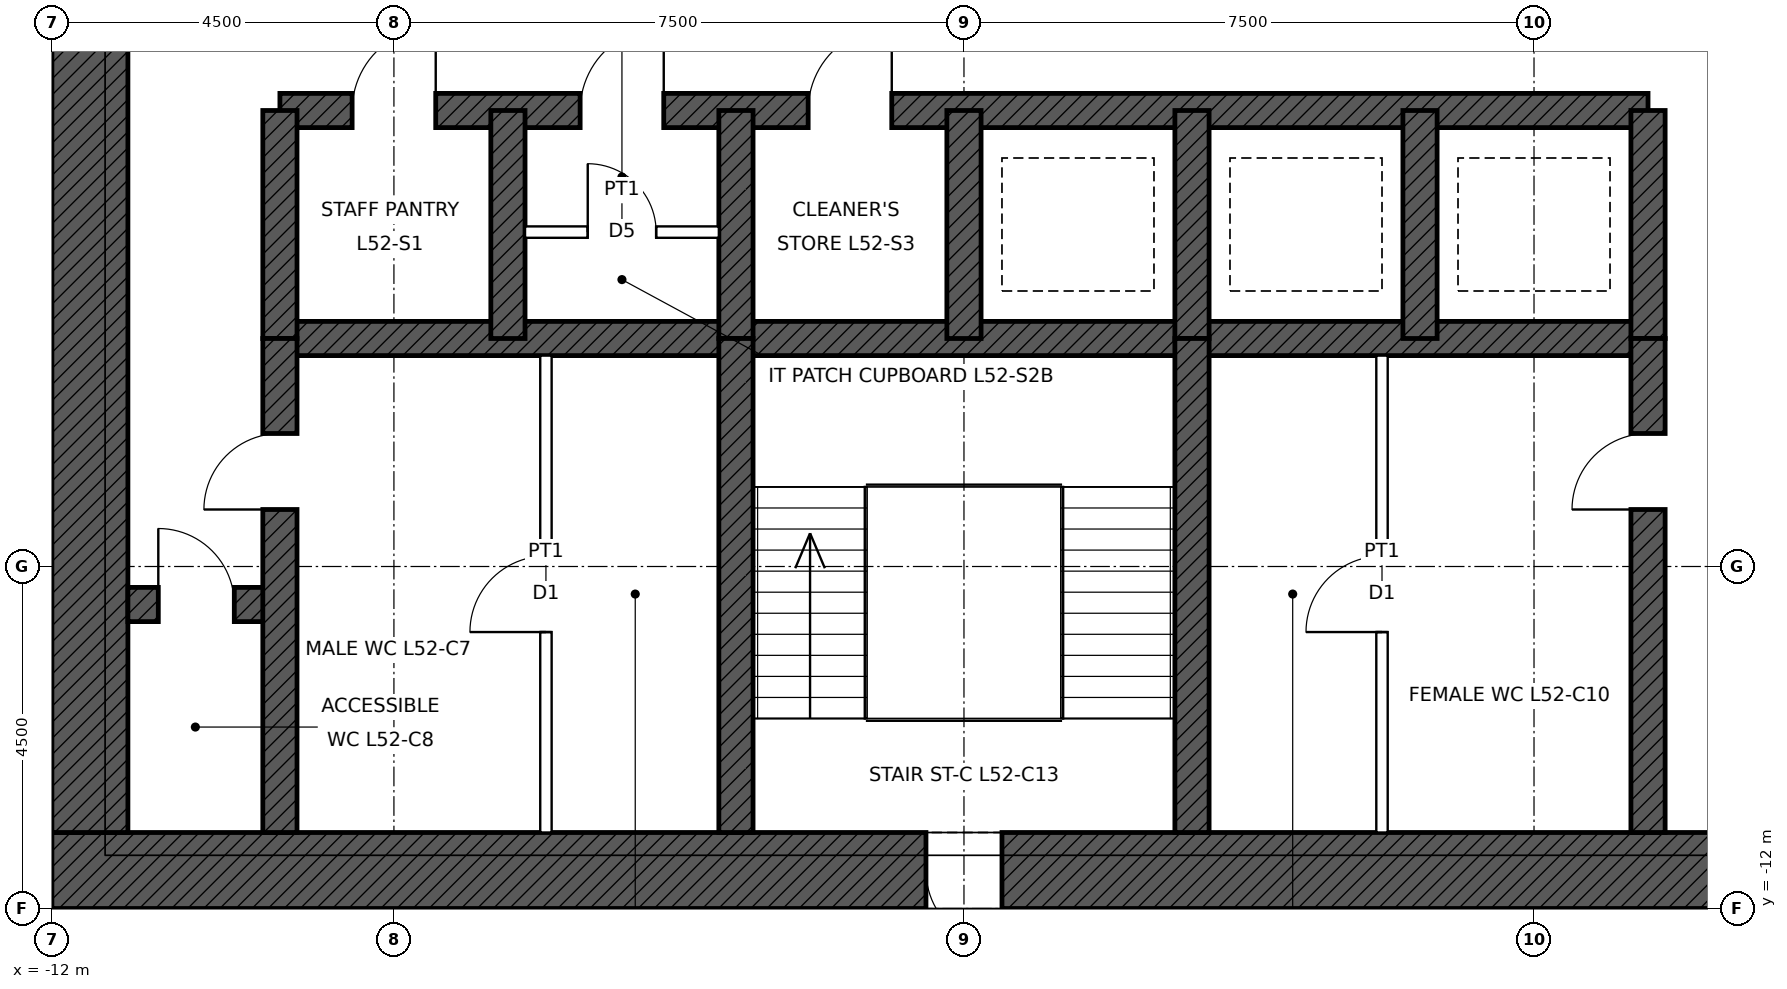
"""IFC4 building model, lengths in metres.
Left out: names, types, materials, properties, quantities, classifications, styles, units other than length and angle.
Written with IfcOpenShell. Run it as: python <this file> out.ifc"""

import sys

from ifc_helpers import new_model, si_unit, direction, frame, frame_2d, origin, place, context, subcontext, project, spatial, rectangle, extrude, element, fill, save


model = new_model("IFC4")
c1 = context("Model", 3, precision=1e-05, world=origin(), true_north=direction((0.0, 1.0)))
c2 = subcontext(c1, "Body", "Model", "MODEL_VIEW")
j1 = project(units=[si_unit("LENGTHUNIT", "METRE"), si_unit("PLANEANGLEUNIT", "RADIAN")], contexts=[c1])
p1 = place(None, origin())
s1 = spatial("IfcSite", under=j1, at=p1, CompositionType="ELEMENT")
p2 = place(p1, origin())
s2 = spatial("IfcBuilding", under=s1, at=p2, CompositionType="ELEMENT")
p3 = place(p2, frame((0.0, 0.0, 241.9)))
s3 = spatial("IfcBuildingStorey", under=s2, at=p3, CompositionType="ELEMENT", Elevation=241.9)
p4 = place(p3, frame((12.0, -11.5, 0.0), z_axis=(0.0, 0.0, 1.0), x_axis=(-1.0, 0.0, 0.0)))
e1 = element("IfcWall", 1, at=p4, inside=s3, PredefinedType="SHEAR", context=c2, shape_type="SweptSolid", body=[
    extrude(rectangle(XDim=24.0, YDim=1.0, at=frame_2d((12.0, 0.0))), origin(), (0.0, 0.0, 1.0), 4.0),
])
p5 = place(p4, frame((11.5, 0.0, 0.0)))
e2 = element("IfcOpeningElement", 2, at=p5, cuts=e1, PredefinedType="OPENING", context=c2, shape_type="SweptSolid", body=[
    extrude(rectangle(XDim=1.0, YDim=2.1, at=frame_2d((0.5, 1.05))), frame((0.0, 0.51, 0.0), z_axis=(0.0, -1.0, 0.0), x_axis=(1.0, 0.0, 0.0)), (0.0, 0.0, 1.0), 1.02),
])
p6 = place(p4, frame((1.0, 0.0, 0.0)))
e3 = element("IfcOpeningElement", 3, at=p6, cuts=e1, PredefinedType="OPENING", context=c2, shape_type="SweptSolid", body=[
    extrude(rectangle(XDim=1.0, YDim=2.4, at=frame_2d((0.5, 1.2))), frame((0.0, 0.51, 0.0), z_axis=(0.0, -1.0, 0.0), x_axis=(1.0, 0.0, 0.0)), (0.0, 0.0, 1.0), 1.02),
])
p7 = place(p3, frame((-11.5, -11.0, 0.0), z_axis=(0.0, 0.0, 1.0), x_axis=(0.0, 1.0, 0.0)))
e4 = element("IfcWall", 4, at=p7, inside=s3, PredefinedType="SHEAR", context=c2, shape_type="SweptSolid", body=[
    extrude(rectangle(XDim=22.0, YDim=1.0, at=frame_2d((11.0, 0.0))), origin(), (0.0, 0.0, 1.0), 4.0),
])
p8 = place(p7, frame((10.5, 0.0, 0.0)))
e5 = element("IfcOpeningElement", 5, at=p8, cuts=e4, PredefinedType="OPENING", context=c2, shape_type="SweptSolid", body=[
    extrude(rectangle(XDim=1.0, YDim=2.4, at=frame_2d((0.5, 1.2))), frame((0.0, 0.51, 0.0), z_axis=(0.0, -1.0, 0.0), x_axis=(1.0, 0.0, 0.0)), (0.0, 0.0, 1.0), 1.02),
])
p9 = place(p3, frame((-9.0, -1.5, 0.0), z_axis=(0.0, 0.0, 1.0), x_axis=(1.0, 0.0, 0.0)))
e6 = element("IfcWall", 6, at=p9, inside=s3, PredefinedType="SHEAR", context=c2, shape_type="SweptSolid", body=[
    extrude(rectangle(XDim=18.0, YDim=0.45, at=frame_2d((9.0, 0.0))), origin(), (0.0, 0.0, 1.0), 4.0),
])
p10 = place(p9, frame((0.95, 0.0, 0.0)))
e7 = element("IfcOpeningElement", 7, at=p10, cuts=e6, PredefinedType="OPENING", context=c2, shape_type="SweptSolid", body=[
    extrude(rectangle(XDim=1.1, YDim=2.1, at=frame_2d((0.55, 1.05))), frame((0.0, 0.235, 0.0), z_axis=(0.0, -1.0, 0.0), x_axis=(1.0, 0.0, 0.0)), (0.0, 0.0, 1.0), 0.47),
])
p11 = place(p9, frame((3.95, 0.0, 0.0)))
e8 = element("IfcOpeningElement", 8, at=p11, cuts=e6, PredefinedType="OPENING", context=c2, shape_type="SweptSolid", body=[
    extrude(rectangle(XDim=1.1, YDim=2.1, at=frame_2d((0.55, 1.05))), frame((0.0, 0.235, 0.0), z_axis=(0.0, -1.0, 0.0), x_axis=(1.0, 0.0, 0.0)), (0.0, 0.0, 1.0), 0.47),
])
p12 = place(p9, frame((6.95, 0.0, 0.0)))
e9 = element("IfcOpeningElement", 9, at=p12, cuts=e6, PredefinedType="OPENING", context=c2, shape_type="SweptSolid", body=[
    extrude(rectangle(XDim=1.1, YDim=2.1, at=frame_2d((0.55, 1.05))), frame((0.0, 0.235, 0.0), z_axis=(0.0, -1.0, 0.0), x_axis=(1.0, 0.0, 0.0)), (0.0, 0.0, 1.0), 0.47),
])
p13 = place(p3, frame((-9.0, -4.5, 0.0), z_axis=(0.0, 0.0, 1.0), x_axis=(1.0, 0.0, 0.0)))
e10 = element("IfcWall", 10, at=p13, inside=s3, PredefinedType="SHEAR", context=c2, shape_type="SweptSolid", body=[
    extrude(rectangle(XDim=18.0, YDim=0.45, at=frame_2d((9.0, 0.0))), origin(), (0.0, 0.0, 1.0), 4.0),
])
p14 = place(p3, frame((-11.0, -8.0, 0.0), z_axis=(0.0, 0.0, 1.0), x_axis=(1.0, 0.0, 0.0)))
e11 = element("IfcWall", 11, at=p14, inside=s3, PredefinedType="SHEAR", context=c2, shape_type="SweptSolid", body=[
    extrude(rectangle(XDim=2.0, YDim=0.45, at=frame_2d((1.0, 0.0))), origin(), (0.0, 0.0, 1.0), 4.0),
])
p15 = place(p14, frame((0.4, 0.0, 0.0)))
e12 = element("IfcOpeningElement", 12, at=p15, cuts=e11, PredefinedType="OPENING", context=c2, shape_type="SweptSolid", body=[
    extrude(rectangle(XDim=1.0, YDim=2.1, at=frame_2d((0.5, 1.05))), frame((0.0, 0.235, 0.0), z_axis=(0.0, -1.0, 0.0), x_axis=(1.0, 0.0, 0.0)), (0.0, 0.0, 1.0), 0.47),
])
for number, where, z_axis, x_axis in (
    (13, (-9.0, -4.5, 0.0), (0.0, 0.0, 1.0), (0.0, 1.0, 0.0)),
    (14, (9.0, -4.5, 0.0), (0.0, 0.0, 1.0), (0.0, 1.0, 0.0)),
    (15, (-6.0, -4.5, 0.0), (0.0, 0.0, 1.0), (0.0, 1.0, 0.0)),
    (16, (-3.0, -4.5, 0.0), (0.0, 0.0, 1.0), (0.0, 1.0, 0.0)),
    (17, (0.0, -4.5, 0.0), (0.0, 0.0, 1.0), (0.0, 1.0, 0.0)),
    (18, (3.0, -4.5, 0.0), (0.0, 0.0, 1.0), (0.0, 1.0, 0.0)),
    (19, (6.0, -4.5, 0.0), (0.0, 0.0, 1.0), (0.0, 1.0, 0.0)),
):
    element("IfcWall", number, at=place(p3, frame(where, z_axis=z_axis, x_axis=x_axis)), inside=s3, PredefinedType="SHEAR", context=c2, shape_type="SweptSolid", body=[
        extrude(rectangle(XDim=3.0, YDim=0.45, at=frame_2d((1.5, 0.0))), origin(), (0.0, 0.0, 1.0), 4.0),
    ])
p16 = place(p3, frame((-9.0, -11.0, 0.0), z_axis=(0.0, 0.0, 1.0), x_axis=(0.0, 1.0, 0.0)))
e20 = element("IfcWall", 20, at=p16, inside=s3, PredefinedType="SHEAR", context=c2, shape_type="SweptSolid", body=[
    extrude(rectangle(XDim=6.5, YDim=0.45, at=frame_2d((3.25, 0.0))), origin(), (0.0, 0.0, 1.0), 4.0),
])
p17 = place(p16, frame((4.25, 0.0, 0.0)))
e21 = element("IfcOpeningElement", 21, at=p17, cuts=e20, PredefinedType="OPENING", context=c2, shape_type="SweptSolid", body=[
    extrude(rectangle(XDim=1.0, YDim=2.1, at=frame_2d((0.5, 1.05))), frame((0.0, 0.235, 0.0), z_axis=(0.0, -1.0, 0.0), x_axis=(1.0, 0.0, 0.0)), (0.0, 0.0, 1.0), 0.47),
])
p18 = place(p3, frame((9.0, -11.0, 0.0), z_axis=(0.0, 0.0, 1.0), x_axis=(0.0, 1.0, 0.0)))
e22 = element("IfcWall", 22, at=p18, inside=s3, PredefinedType="SHEAR", context=c2, shape_type="SweptSolid", body=[
    extrude(rectangle(XDim=6.5, YDim=0.45, at=frame_2d((3.25, 0.0))), origin(), (0.0, 0.0, 1.0), 4.0),
])
p19 = place(p18, frame((4.25, 0.0, 0.0)))
e23 = element("IfcOpeningElement", 23, at=p19, cuts=e22, PredefinedType="OPENING", context=c2, shape_type="SweptSolid", body=[
    extrude(rectangle(XDim=1.0, YDim=2.1, at=frame_2d((0.5, 1.05))), frame((0.0, 0.235, 0.0), z_axis=(0.0, -1.0, 0.0), x_axis=(1.0, 0.0, 0.0)), (0.0, 0.0, 1.0), 0.47),
])
for number, where, z_axis, x_axis in (
    (24, (-3.0, -11.0, 0.0), (0.0, 0.0, 1.0), (0.0, 1.0, 0.0)),
    (25, (3.0, -11.0, 0.0), (0.0, 0.0, 1.0), (0.0, 1.0, 0.0)),
):
    element("IfcWall", number, at=place(p3, frame(where, z_axis=z_axis, x_axis=x_axis)), inside=s3, PredefinedType="SHEAR", context=c2, shape_type="SweptSolid", body=[
        extrude(rectangle(XDim=6.5, YDim=0.45, at=frame_2d((3.25, 0.0))), origin(), (0.0, 0.0, 1.0), 4.0),
    ])
p20 = place(p3, frame((-5.5, -11.0, 0.0), z_axis=(0.0, 0.0, 1.0), x_axis=(0.0, 1.0, 0.0)))
e26 = element("IfcWall", 26, at=p20, inside=s3, PredefinedType="PARTITIONING", context=c2, shape_type="SweptSolid", body=[
    extrude(rectangle(XDim=6.275, YDim=0.15, at=frame_2d((3.137, 0.0))), origin(), (0.0, 0.0, 1.0), 3.75),
])
p21 = place(p20, frame((2.637, 0.0, 0.0)))
e27 = element("IfcOpeningElement", 27, at=p21, cuts=e26, PredefinedType="OPENING", context=c2, shape_type="SweptSolid", body=[
    extrude(rectangle(XDim=1.0, YDim=2.1, at=frame_2d((0.5, 1.05))), frame((0.0, 0.085, 0.0), z_axis=(0.0, -1.0, 0.0), x_axis=(1.0, 0.0, 0.0)), (0.0, 0.0, 1.0), 0.17),
])
p22 = place(p3, frame((5.5, -11.0, 0.0), z_axis=(0.0, 0.0, 1.0), x_axis=(0.0, 1.0, 0.0)))
e28 = element("IfcWall", 28, at=p22, inside=s3, PredefinedType="PARTITIONING", context=c2, shape_type="SweptSolid", body=[
    extrude(rectangle(XDim=6.275, YDim=0.15, at=frame_2d((3.137, 0.0))), origin(), (0.0, 0.0, 1.0), 3.75),
])
p23 = place(p22, frame((2.637, 0.0, 0.0)))
e29 = element("IfcOpeningElement", 29, at=p23, cuts=e28, PredefinedType="OPENING", context=c2, shape_type="SweptSolid", body=[
    extrude(rectangle(XDim=1.0, YDim=2.1, at=frame_2d((0.5, 1.05))), frame((0.0, 0.085, 0.0), z_axis=(0.0, -1.0, 0.0), x_axis=(1.0, 0.0, 0.0)), (0.0, 0.0, 1.0), 0.17),
])
p24 = place(p3, frame((-5.775, -3.1, 0.0), z_axis=(0.0, 0.0, 1.0), x_axis=(1.0, 0.0, 0.0)))
e30 = element("IfcWall", 30, at=p24, inside=s3, PredefinedType="PARTITIONING", context=c2, shape_type="SweptSolid", body=[
    extrude(rectangle(XDim=2.55, YDim=0.15, at=frame_2d((1.275, 0.0))), origin(), (0.0, 0.0, 1.0), 3.75),
])
p25 = place(p24, frame((0.825, 0.0, 0.0)))
e31 = element("IfcOpeningElement", 31, at=p25, cuts=e30, PredefinedType="OPENING", context=c2, shape_type="SweptSolid", body=[
    extrude(rectangle(XDim=0.9, YDim=2.1, at=frame_2d((0.45, 1.05))), frame((0.0, 0.085, 0.0), z_axis=(0.0, -1.0, 0.0), x_axis=(1.0, 0.0, 0.0)), (0.0, 0.0, 1.0), 0.17),
])
p26 = place(p5, origin())
e32 = element("IfcDoor", 32, at=p26, inside=s3, OperationType="SINGLE_SWING_LEFT", PredefinedType="DOOR", context=c2, shape_type="SweptSolid", body=[
    extrude(rectangle(XDim=1.0, YDim=2.1, at=frame_2d((0.5, 1.05))), frame((0.0, 0.485, 0.0), z_axis=(0.0, -1.0, 0.0), x_axis=(1.0, 0.0, 0.0)), (0.0, 0.0, 1.0), 0.05),
])
fill(e2, e32)
p27 = place(p17, origin())
e33 = element("IfcDoor", 33, at=p27, inside=s3, OperationType="SINGLE_SWING_LEFT", PredefinedType="DOOR", context=c2, shape_type="SweptSolid", body=[
    extrude(rectangle(XDim=1.0, YDim=2.1, at=frame_2d((0.5, 1.05))), frame((0.0, 0.025, 0.0), z_axis=(0.0, -1.0, 0.0), x_axis=(1.0, 0.0, 0.0)), (0.0, 0.0, 1.0), 0.05),
])
fill(e21, e33)
p28 = place(p19, origin())
e34 = element("IfcDoor", 34, at=p28, inside=s3, OperationType="SINGLE_SWING_LEFT", PredefinedType="DOOR", context=c2, shape_type="SweptSolid", body=[
    extrude(rectangle(XDim=1.0, YDim=2.1, at=frame_2d((0.5, 1.05))), frame((0.0, 0.025, 0.0), z_axis=(0.0, -1.0, 0.0), x_axis=(1.0, 0.0, 0.0)), (0.0, 0.0, 1.0), 0.05),
])
fill(e23, e34)
p29 = place(p15, origin())
e35 = element("IfcDoor", 35, at=p29, inside=s3, OperationType="SINGLE_SWING_LEFT", PredefinedType="DOOR", context=c2, shape_type="SweptSolid", body=[
    extrude(rectangle(XDim=1.0, YDim=2.1, at=frame_2d((0.5, 1.05))), frame((0.0, 0.025, 0.0), z_axis=(0.0, -1.0, 0.0), x_axis=(1.0, 0.0, 0.0)), (0.0, 0.0, 1.0), 0.05),
])
fill(e12, e35)
p30 = place(p21, origin())
e36 = element("IfcDoor", 36, at=p30, inside=s3, OperationType="SINGLE_SWING_LEFT", PredefinedType="DOOR", context=c2, shape_type="SweptSolid", body=[
    extrude(rectangle(XDim=1.0, YDim=2.1, at=frame_2d((0.5, 1.05))), frame((0.0, 0.025, 0.0), z_axis=(0.0, -1.0, 0.0), x_axis=(1.0, 0.0, 0.0)), (0.0, 0.0, 1.0), 0.05),
])
fill(e27, e36)
p31 = place(p23, origin())
e37 = element("IfcDoor", 37, at=p31, inside=s3, OperationType="SINGLE_SWING_LEFT", PredefinedType="DOOR", context=c2, shape_type="SweptSolid", body=[
    extrude(rectangle(XDim=1.0, YDim=2.1, at=frame_2d((0.5, 1.05))), frame((0.0, 0.025, 0.0), z_axis=(0.0, -1.0, 0.0), x_axis=(1.0, 0.0, 0.0)), (0.0, 0.0, 1.0), 0.05),
])
fill(e29, e37)
p32 = place(p10, origin())
e38 = element("IfcDoor", 38, at=p32, inside=s3, OperationType="SINGLE_SWING_RIGHT", PredefinedType="DOOR", context=c2, shape_type="SweptSolid", body=[
    extrude(rectangle(XDim=1.1, YDim=2.1, at=frame_2d((0.55, 1.05))), frame((0.0, 0.025, 0.0), z_axis=(0.0, -1.0, 0.0), x_axis=(1.0, 0.0, 0.0)), (0.0, 0.0, 1.0), 0.05),
])
fill(e7, e38)
p33 = place(p11, origin())
e39 = element("IfcDoor", 39, at=p33, inside=s3, OperationType="SINGLE_SWING_RIGHT", PredefinedType="DOOR", context=c2, shape_type="SweptSolid", body=[
    extrude(rectangle(XDim=1.1, YDim=2.1, at=frame_2d((0.55, 1.05))), frame((0.0, 0.025, 0.0), z_axis=(0.0, -1.0, 0.0), x_axis=(1.0, 0.0, 0.0)), (0.0, 0.0, 1.0), 0.05),
])
fill(e8, e39)
p34 = place(p25, origin())
e40 = element("IfcDoor", 40, at=p34, inside=s3, OperationType="SINGLE_SWING_LEFT", PredefinedType="DOOR", context=c2, shape_type="SweptSolid", body=[
    extrude(rectangle(XDim=0.9, YDim=2.1, at=frame_2d((0.45, 1.05))), frame((0.0, 0.025, 0.0), z_axis=(0.0, -1.0, 0.0), x_axis=(1.0, 0.0, 0.0)), (0.0, 0.0, 1.0), 0.05),
])
fill(e31, e40)
p35 = place(p12, origin())
e41 = element("IfcDoor", 41, at=p35, inside=s3, OperationType="SINGLE_SWING_RIGHT", PredefinedType="DOOR", context=c2, shape_type="SweptSolid", body=[
    extrude(rectangle(XDim=1.1, YDim=2.1, at=frame_2d((0.55, 1.05))), frame((0.0, 0.025, 0.0), z_axis=(0.0, -1.0, 0.0), x_axis=(1.0, 0.0, 0.0)), (0.0, 0.0, 1.0), 0.05),
])
fill(e9, e41)
save(model, sys.argv[1])
